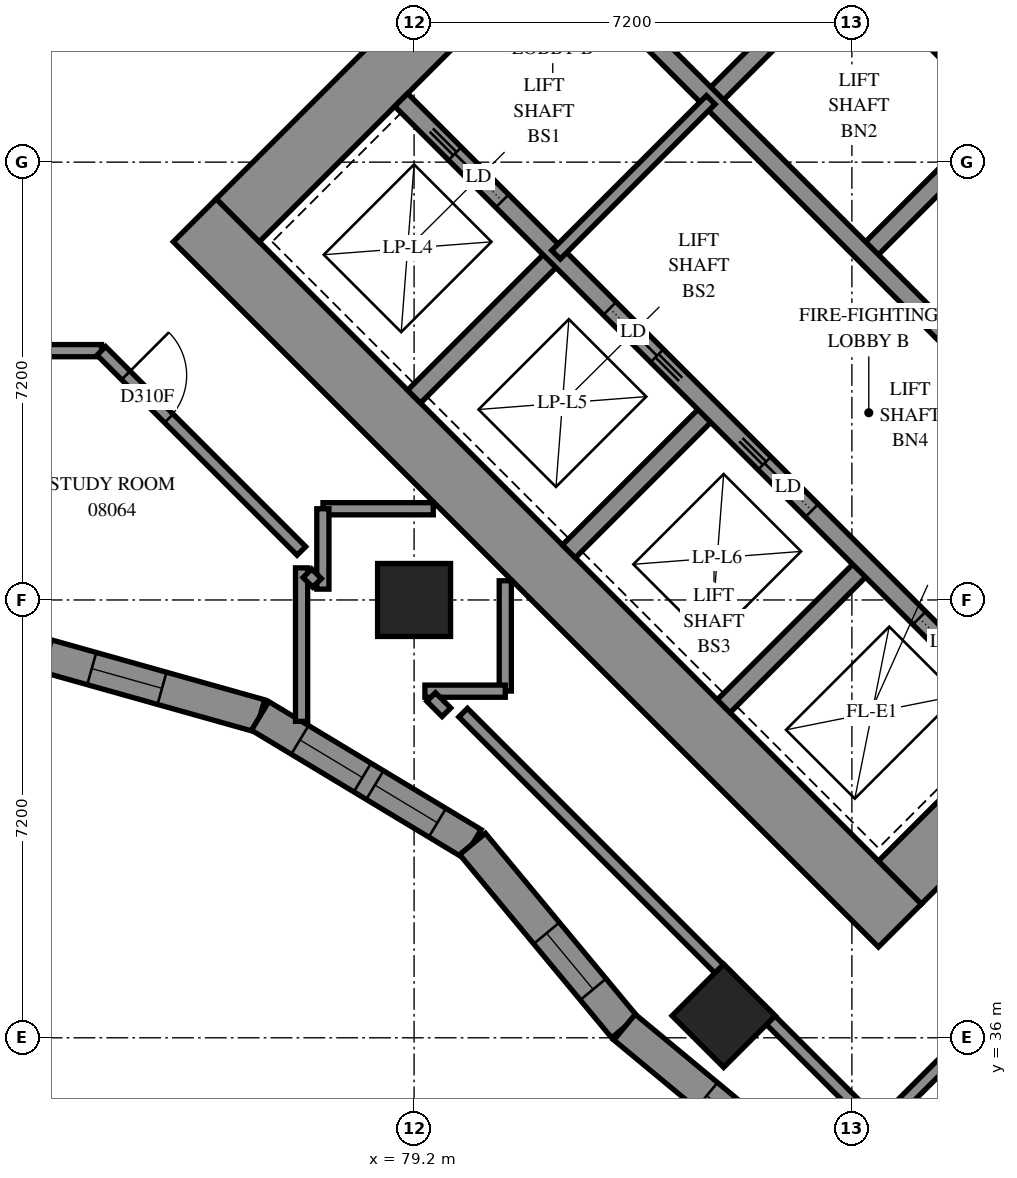
"""IFC4 building model, lengths in metres.
Left out: names, types, materials, properties, quantities, classifications, styles, units other than length and angle.
Written with IfcOpenShell. Run it as: python <this file> out.ifc"""

import sys

from ifc_helpers import new_model, si_unit, direction, frame, frame_2d, origin, origin_2d, place, context, subcontext, project, spatial, polyline, rectangle, outline, extrude, element, fill, save


model = new_model("IFC4")
c1 = context("Model", 3, precision=1e-05, world=origin(), true_north=direction((0.0, 1.0)))
c2 = subcontext(c1, "Body", "Model", "MODEL_VIEW")
j1 = project(units=[si_unit("LENGTHUNIT", "METRE"), si_unit("PLANEANGLEUNIT", "RADIAN")], contexts=[c1])
p1 = place(None, origin())
s1 = spatial("IfcSite", under=j1, at=p1, CompositionType="ELEMENT")
p2 = place(p1, origin())
s2 = spatial("IfcBuilding", under=s1, at=p2, CompositionType="ELEMENT")
p3 = place(p2, frame((0.0, 0.0, 33.8)))
s3 = spatial("IfcBuildingStorey", under=s2, at=p3, CompositionType="ELEMENT", Elevation=33.8)
for number, where, z_axis, x_axis in (
    (1, (79.2, 43.2, 0.0), (0.0, 0.0, 1.0), (1.0, 0.0, 0.0)),
    (2, (84.291, 36.362, 0.0), (0.0, 0.0, 1.0), (0.707, -0.707, 0.0)),
):
    element("IfcColumn", number, at=place(p3, frame(where, z_axis=z_axis, x_axis=x_axis)), inside=s3, PredefinedType="COLUMN", context=c2, shape_type="SweptSolid", body=[
        extrude(rectangle(XDim=1.2, YDim=1.2, at=origin_2d()), origin(), (0.0, 0.0, 1.0), 3.1),
    ])
p4 = place(p3, frame((75.594, 49.443, -0.3), z_axis=(0.0, 0.0, 1.0), x_axis=(0.7071037324, -0.70710983, 0.0)))
e3 = element("IfcWall", 3, at=p4, inside=s3, PredefinedType="SHEAR", context=c2, shape_type="SweptSolid", body=[
    extrude(rectangle(XDim=16.4, YDim=1.0, at=frame_2d((8.2, 0.0))), origin(), (0.0, 0.0, 1.0), 2.7),
])
p5 = place(p3, frame((86.483, 60.333, -0.3), z_axis=(0.0, 0.0, 1.0), x_axis=(0.70710983, -0.7071037324, 0.0)))
e4 = element("IfcWall", 4, at=p5, inside=s3, PredefinedType="SHEAR", context=c2, shape_type="SweptSolid", body=[
    extrude(rectangle(XDim=16.4, YDim=1.0, at=frame_2d((8.2, 0.0))), origin(), (0.0, 0.0, 1.0), 2.7),
])
p6 = place(p5, frame((11.0, 0.0, 0.3)))
e5 = element("IfcOpeningElement", 5, at=p6, cuts=e4, PredefinedType="OPENING", context=c2, shape_type="SweptSolid", body=[
    extrude(rectangle(XDim=0.8, YDim=2.1, at=frame_2d((0.4, 1.05))), frame((0.0, 0.51, 0.0), z_axis=(0.0, -1.0, 0.0), x_axis=(1.0, 0.0, 0.0)), (0.0, 0.0, 1.0), 1.02),
])
p7 = place(p3, frame((76.301, 49.443, -0.3), z_axis=(0.0, 0.0, 1.0), x_axis=(0.7071067812, 0.7071067812, 0.0)))
e6 = element("IfcWall", 6, at=p7, inside=s3, PredefinedType="SHEAR", context=c2, shape_type="SweptSolid", body=[
    extrude(rectangle(XDim=14.4, YDim=1.0, at=frame_2d((7.2, 0.0))), origin(), (0.0, 0.0, 1.0), 2.7),
])
p8 = place(p7, frame((4.55, 0.0, 0.3)))
e7 = element("IfcOpeningElement", 7, at=p8, cuts=e6, PredefinedType="OPENING", context=c2, shape_type="SweptSolid", body=[
    extrude(rectangle(XDim=1.1, YDim=2.1, at=frame_2d((0.55, 1.05))), frame((0.0, 0.51, 0.0), z_axis=(0.0, -1.0, 0.0), x_axis=(1.0, 0.0, 0.0)), (0.0, 0.0, 1.0), 1.02),
])
p9 = place(p7, frame((11.35, 0.0, 0.3)))
e8 = element("IfcOpeningElement", 8, at=p9, cuts=e6, PredefinedType="OPENING", context=c2, shape_type="SweptSolid", body=[
    extrude(rectangle(XDim=1.1, YDim=2.1, at=frame_2d((0.55, 1.05))), frame((0.0, 0.51, 0.0), z_axis=(0.0, -1.0, 0.0), x_axis=(1.0, 0.0, 0.0)), (0.0, 0.0, 1.0), 1.02),
])
p10 = place(p3, frame((87.19, 38.554, -0.3), z_axis=(0.0, 0.0, 1.0), x_axis=(0.707103309, 0.7071102534, 0.0)))
e9 = element("IfcWall", 9, at=p10, inside=s3, PredefinedType="SHEAR", context=c2, shape_type="SweptSolid", body=[
    extrude(rectangle(XDim=14.4, YDim=1.0, at=frame_2d((7.2, 0.0))), origin(), (0.0, 0.0, 1.0), 2.7),
])
p11 = place(p10, frame((4.55, 0.0, 0.3)))
e10 = element("IfcOpeningElement", 10, at=p11, cuts=e9, PredefinedType="OPENING", context=c2, shape_type="SweptSolid", body=[
    extrude(rectangle(XDim=1.1, YDim=2.1, at=frame_2d((0.55, 1.05))), frame((0.0, 0.51, 0.0), z_axis=(0.0, -1.0, 0.0), x_axis=(1.0, 0.0, 0.0)), (0.0, 0.0, 1.0), 1.02),
])
p12 = place(p10, frame((11.35, 0.0, 0.3)))
e11 = element("IfcOpeningElement", 11, at=p12, cuts=e9, PredefinedType="OPENING", context=c2, shape_type="SweptSolid", body=[
    extrude(rectangle(XDim=1.1, YDim=2.1, at=frame_2d((0.55, 1.05))), frame((0.0, 0.51, 0.0), z_axis=(0.0, -1.0, 0.0), x_axis=(1.0, 0.0, 0.0)), (0.0, 0.0, 1.0), 1.02),
])
for number, where, z_axis, x_axis in (
    (12, (79.2, 46.544, 0.0), (0.0, 0.0, 1.0), (0.707, 0.707, 0.0)),
    (13, (84.079, 51.423, 0.0), (0.0, 0.0, 1.0), (0.707, 0.707, 0.0)),
):
    element("IfcWall", number, at=place(p3, frame(where, z_axis=z_axis, x_axis=x_axis)), inside=s3, PredefinedType="SOLIDWALL", context=c2, shape_type="SweptSolid", body=[
        extrude(rectangle(XDim=3.3, YDim=0.3, at=frame_2d((1.65, 0.0))), origin(), (0.0, 0.0, 1.0), 3.1),
    ])
p13 = place(p3, frame((81.746, 43.999, 0.0), z_axis=(0.0, 0.0, 1.0), x_axis=(0.7071067812, 0.7071067812, 0.0)))
e14 = element("IfcWall", 14, at=p13, inside=s3, PredefinedType="SOLIDWALL", context=c2, shape_type="SweptSolid", body=[
    extrude(rectangle(XDim=3.3, YDim=0.3, at=frame_2d((1.65, 0.0))), origin(), (0.0, 0.0, 1.0), 3.1),
])
p14 = place(p3, frame((86.625, 48.878, 0.0), z_axis=(0.0, 0.0, 1.0), x_axis=(0.7071067812, 0.7071067812, 0.0)))
e15 = element("IfcWall", 15, at=p14, inside=s3, PredefinedType="SOLIDWALL", context=c2, shape_type="SweptSolid", body=[
    extrude(rectangle(XDim=3.3, YDim=0.3, at=frame_2d((1.65, 0.0))), origin(), (0.0, 0.0, 1.0), 3.1),
])
p15 = place(p3, frame((84.291, 41.453, 0.0), z_axis=(0.0, 0.0, 1.0), x_axis=(0.7071067812, 0.7071067812, 0.0)))
e16 = element("IfcWall", 16, at=p15, inside=s3, PredefinedType="SOLIDWALL", context=c2, shape_type="SweptSolid", body=[
    extrude(rectangle(XDim=3.3, YDim=0.3, at=frame_2d((1.65, 0.0))), origin(), (0.0, 0.0, 1.0), 3.1),
])
p16 = place(p3, frame((78.988, 51.423, 0.0), z_axis=(0.0, 0.0, 1.0), x_axis=(0.7071067812, -0.7071067812, 0.0)))
e17 = element("IfcWall", 17, at=p16, inside=s3, PredefinedType="SOLIDWALL", context=c2, shape_type="SweptSolid", body=[
    extrude(rectangle(XDim=14.4, YDim=0.3, at=frame_2d((7.2, 0.0))), origin(), (0.0, 0.0, 1.0), 3.1),
])
p17 = place(p16, frame((1.25, 0.0, 0.0)))
e18 = element("IfcOpeningElement", 18, at=p17, cuts=e17, PredefinedType="OPENING", context=c2, shape_type="SweptSolid", body=[
    extrude(rectangle(XDim=1.1, YDim=2.1, at=frame_2d((0.55, 1.05))), frame((0.0, 0.16, 0.0), z_axis=(0.0, -1.0, 0.0), x_axis=(1.0, 0.0, 0.0)), (0.0, 0.0, 1.0), 0.32),
])
p18 = place(p16, frame((4.85, 0.0, 0.0)))
e19 = element("IfcOpeningElement", 19, at=p18, cuts=e17, PredefinedType="OPENING", context=c2, shape_type="SweptSolid", body=[
    extrude(rectangle(XDim=1.1, YDim=2.1, at=frame_2d((0.55, 1.05))), frame((0.0, 0.16, 0.0), z_axis=(0.0, -1.0, 0.0), x_axis=(1.0, 0.0, 0.0)), (0.0, 0.0, 1.0), 0.32),
])
p19 = place(p16, frame((8.45, 0.0, 0.0)))
e20 = element("IfcOpeningElement", 20, at=p19, cuts=e17, PredefinedType="OPENING", context=c2, shape_type="SweptSolid", body=[
    extrude(rectangle(XDim=1.1, YDim=2.1, at=frame_2d((0.55, 1.05))), frame((0.0, 0.16, 0.0), z_axis=(0.0, -1.0, 0.0), x_axis=(1.0, 0.0, 0.0)), (0.0, 0.0, 1.0), 0.32),
])
p20 = place(p16, frame((12.05, 0.0, 0.0)))
e21 = element("IfcOpeningElement", 21, at=p20, cuts=e17, PredefinedType="OPENING", context=c2, shape_type="SweptSolid", body=[
    extrude(rectangle(XDim=1.1, YDim=2.1, at=frame_2d((0.55, 1.05))), frame((0.0, 0.16, 0.0), z_axis=(0.0, -1.0, 0.0), x_axis=(1.0, 0.0, 0.0)), (0.0, 0.0, 1.0), 0.32),
])
p21 = place(p3, frame((81.534, 53.969, 0.0), z_axis=(0.0, 0.0, 1.0), x_axis=(0.707103309, -0.7071102534, 0.0)))
e22 = element("IfcWall", 22, at=p21, inside=s3, PredefinedType="SOLIDWALL", context=c2, shape_type="SweptSolid", body=[
    extrude(rectangle(XDim=14.4, YDim=0.3, at=frame_2d((7.2, 0.0))), origin(), (0.0, 0.0, 1.0), 3.1),
])
p22 = place(p21, frame((12.05, 0.0, 0.0)))
e23 = element("IfcOpeningElement", 23, at=p22, cuts=e22, PredefinedType="OPENING", context=c2, shape_type="SweptSolid", body=[
    extrude(rectangle(XDim=1.1, YDim=2.1, at=frame_2d((0.55, 1.05))), frame((0.0, 0.16, 0.0), z_axis=(0.0, -1.0, 0.0), x_axis=(1.0, 0.0, 0.0)), (0.0, 0.0, 1.0), 0.32),
])
p23 = place(p3, frame((83.867, 56.302, 0.0), z_axis=(0.0, 0.0, 1.0), x_axis=(0.7071137256, -0.7070998367, 0.0)))
e24 = element("IfcWall", 24, at=p23, inside=s3, PredefinedType="SOLIDWALL", context=c2, shape_type="SweptSolid", body=[
    extrude(rectangle(XDim=7.2, YDim=0.3, at=frame_2d((3.6, 0.0))), origin(), (0.0, 0.0, 1.0), 3.1),
])
p24 = place(p3, frame((73.162, 42.279, 0.0), z_axis=(0.0, 0.0, 1.0), x_axis=(0.9627115194, -0.2705300916, 0.0)))
e25 = element("IfcWall", 25, at=p24, inside=s3, PredefinedType="SOLIDWALL", context=c2, shape_type="SweptSolid", body=[
    extrude(outline(polyline([(0.053, -0.275), (3.605, -0.275), (3.679, 0.275), (-0.053, 0.275), (0.053, -0.275)])), origin(), (0.0, 0.0, 1.0), 3.1),
])
p25 = place(p24, frame((0.766, 0.0, 0.5)))
e26 = element("IfcOpeningElement", 26, at=p25, cuts=e25, PredefinedType="OPENING", context=c2, shape_type="SweptSolid", body=[
    extrude(rectangle(XDim=1.2, YDim=2.45, at=frame_2d((0.6, 1.225))), frame((0.0, 0.285, 0.0), z_axis=(0.0, -1.0, 0.0), x_axis=(1.0, 0.0, 0.0)), (0.0, 0.0, 1.0), 0.57),
])
p26 = place(p3, frame((76.668, 41.294, 0.0), z_axis=(0.0, 0.0, 1.0), x_axis=(0.8564375758, -0.5162505968, 0.0)))
e27 = element("IfcWall", 27, at=p26, inside=s3, PredefinedType="SOLIDWALL", context=c2, shape_type="SweptSolid", body=[
    extrude(outline(polyline([(0.037, -0.275), (4.032, -0.275), (4.125, 0.275), (-0.037, 0.275), (0.037, -0.275)])), origin(), (0.0, 0.0, 1.0), 3.1),
])
p27 = place(p26, frame((0.764, 0.0, 0.5)))
e28 = element("IfcOpeningElement", 28, at=p27, cuts=e27, PredefinedType="OPENING", context=c2, shape_type="SweptSolid", body=[
    extrude(rectangle(XDim=1.2, YDim=2.45, at=frame_2d((0.6, 1.225))), frame((0.0, 0.285, 0.0), z_axis=(0.0, -1.0, 0.0), x_axis=(1.0, 0.0, 0.0)), (0.0, 0.0, 1.0), 0.57),
])
p28 = place(p26, frame((2.204, 0.0, 0.5)))
e29 = element("IfcOpeningElement", 29, at=p28, cuts=e27, PredefinedType="OPENING", context=c2, shape_type="SweptSolid", body=[
    extrude(rectangle(XDim=1.2, YDim=2.45, at=frame_2d((0.6, 1.225))), frame((0.0, 0.285, 0.0), z_axis=(0.0, -1.0, 0.0), x_axis=(1.0, 0.0, 0.0)), (0.0, 0.0, 1.0), 0.57),
])
p29 = place(p3, frame((80.161, 39.188, 0.0), z_axis=(0.0, 0.0, 1.0), x_axis=(0.6385248375, -0.7696012161, 0.0)))
e30 = element("IfcWall", 30, at=p29, inside=s3, PredefinedType="SOLIDWALL", context=c2, shape_type="SweptSolid", body=[
    extrude(outline(polyline([(0.047, -0.275), (3.941, -0.275), (3.89, 0.275), (-0.047, 0.275), (0.047, -0.275)])), origin(), (0.0, 0.0, 1.0), 3.1),
])
p30 = place(p29, frame((1.907, 0.0, 0.5)))
e31 = element("IfcOpeningElement", 31, at=p30, cuts=e30, PredefinedType="OPENING", context=c2, shape_type="SweptSolid", body=[
    extrude(rectangle(XDim=1.2, YDim=2.45, at=frame_2d((0.6, 1.225))), frame((0.0, 0.285, 0.0), z_axis=(0.0, -1.0, 0.0), x_axis=(1.0, 0.0, 0.0)), (0.0, 0.0, 1.0), 0.57),
])
p31 = place(p3, frame((82.661, 36.175, 0.0), z_axis=(0.0, 0.0, 1.0), x_axis=(0.7696065296, -0.6385184333, 0.0)))
e32 = element("IfcWall", 32, at=p31, inside=s3, PredefinedType="SOLIDWALL", context=c2, shape_type="SweptSolid", body=[
    extrude(outline(polyline([(-0.026, -0.275), (3.869, -0.275), (3.92, 0.275), (0.026, 0.275), (-0.026, -0.275)])), origin(), (0.0, 0.0, 1.0), 3.1),
])
p32 = place(p31, frame((1.76, 0.0, 0.5)))
e33 = element("IfcOpeningElement", 33, at=p32, cuts=e32, PredefinedType="OPENING", context=c2, shape_type="SweptSolid", body=[
    extrude(rectangle(XDim=1.2, YDim=2.45, at=frame_2d((0.6, 1.225))), frame((0.0, 0.285, 0.0), z_axis=(0.0, -1.0, 0.0), x_axis=(1.0, 0.0, 0.0)), (0.0, 0.0, 1.0), 0.57),
])
p33 = place(p3, frame((81.534, 48.878, 0.0), z_axis=(0.0, 0.0, 1.0), x_axis=(0.707092892, 0.7071206701, 0.0)))
e34 = element("IfcWall", 34, at=p33, inside=s3, PredefinedType="PARTITIONING", context=c2, shape_type="SweptSolid", body=[
    extrude(rectangle(XDim=3.6, YDim=0.2, at=frame_2d((1.8, 0.0))), origin(), (0.0, 0.0, 1.0), 3.1),
])
p34 = place(p3, frame((54.5, 47.3, 0.0), z_axis=(0.0, 0.0, 1.0), x_axis=(1.0, 0.0, 0.0)))
e35 = element("IfcWall", 35, at=p34, inside=s3, PredefinedType="PARTITIONING", context=c2, shape_type="SweptSolid", body=[
    extrude(rectangle(XDim=19.56, YDim=0.2, at=frame_2d((9.78, 0.0))), origin(), (0.0, 0.0, 1.0), 3.1),
])
p35 = place(p34, frame((0.243, 0.0, 0.0)))
e36 = element("IfcOpeningElement", 36, at=p35, cuts=e35, PredefinedType="OPENING", context=c2, shape_type="SweptSolid", body=[
    extrude(rectangle(XDim=1.0, YDim=2.1, at=frame_2d((0.5, 1.05))), frame((0.0, 0.11, 0.0), z_axis=(0.0, -1.0, 0.0), x_axis=(1.0, 0.0, 0.0)), (0.0, 0.0, 1.0), 0.22),
])
p36 = place(p34, frame((5.4, 0.0, 0.0)))
e37 = element("IfcOpeningElement", 37, at=p36, cuts=e35, PredefinedType="OPENING", context=c2, shape_type="SweptSolid", body=[
    extrude(rectangle(XDim=0.9, YDim=2.1, at=frame_2d((0.45, 1.05))), frame((0.0, 0.11, 0.0), z_axis=(0.0, -1.0, 0.0), x_axis=(1.0, 0.0, 0.0)), (0.0, 0.0, 1.0), 0.22),
])
p37 = place(p34, frame((7.1, 0.0, 0.0)))
e38 = element("IfcOpeningElement", 38, at=p37, cuts=e35, PredefinedType="OPENING", context=c2, shape_type="SweptSolid", body=[
    extrude(rectangle(XDim=0.9, YDim=2.1, at=frame_2d((0.45, 1.05))), frame((0.0, 0.11, 0.0), z_axis=(0.0, -1.0, 0.0), x_axis=(1.0, 0.0, 0.0)), (0.0, 0.0, 1.0), 0.22),
])
p38 = place(p34, frame((12.6, 0.0, 0.0)))
e39 = element("IfcOpeningElement", 39, at=p38, cuts=e35, PredefinedType="OPENING", context=c2, shape_type="SweptSolid", body=[
    extrude(rectangle(XDim=0.9, YDim=2.1, at=frame_2d((0.45, 1.05))), frame((0.0, 0.11, 0.0), z_axis=(0.0, -1.0, 0.0), x_axis=(1.0, 0.0, 0.0)), (0.0, 0.0, 1.0), 0.22),
])
p39 = place(p34, frame((14.3, 0.0, 0.0)))
e40 = element("IfcOpeningElement", 40, at=p39, cuts=e35, PredefinedType="OPENING", context=c2, shape_type="SweptSolid", body=[
    extrude(rectangle(XDim=0.9, YDim=2.1, at=frame_2d((0.45, 1.05))), frame((0.0, 0.11, 0.0), z_axis=(0.0, -1.0, 0.0), x_axis=(1.0, 0.0, 0.0)), (0.0, 0.0, 1.0), 0.22),
])
p40 = place(p3, frame((86.838, 34.522, 0.0), z_axis=(0.0, 0.0, 1.0), x_axis=(0.7072154749, 0.7069980708, 0.0)))
e41 = element("IfcWall", 41, at=p40, inside=s3, PredefinedType="PARTITIONING", context=c2, shape_type="SweptSolid", body=[
    extrude(rectangle(XDim=9.2, YDim=0.2, at=frame_2d((4.6, 0.0))), origin(), (0.0, 0.0, 1.0), 3.1),
])
p41 = place(p3, frame((86.332, 33.307, 0.0), z_axis=(0.0, 0.0, 1.0), x_axis=(0.7069820292, 0.7072315112, 0.0)))
e42 = element("IfcWall", 42, at=p41, inside=s3, PredefinedType="PARTITIONING", context=c2, shape_type="SweptSolid", body=[
    extrude(rectangle(XDim=8.017, YDim=0.2, at=frame_2d((4.008, 0.0))), origin(), (0.0, 0.0, 1.0), 3.1),
])
p42 = place(p3, frame((80.007, 41.347, 0.0), z_axis=(0.0, 0.0, 1.0), x_axis=(0.7071067812, -0.7071067812, 0.0)))
e43 = element("IfcWall", 43, at=p42, inside=s3, PredefinedType="PARTITIONING", context=c2, shape_type="SweptSolid", body=[
    extrude(rectangle(XDim=6.206, YDim=0.2, at=frame_2d((3.103, 0.0))), origin(), (0.0, 0.0, 1.0), 3.1),
])
p43 = place(p3, frame((74.057, 47.297, 0.0), z_axis=(0.0, 0.0, 1.0), x_axis=(0.7071067812, -0.7071067812, 0.0)))
e44 = element("IfcWall", 44, at=p43, inside=s3, PredefinedType="PARTITIONING", context=c2, shape_type="SweptSolid", body=[
    extrude(rectangle(XDim=4.653, YDim=0.2, at=frame_2d((2.326, 0.0))), origin(), (0.0, 0.0, 1.0), 3.1),
])
p44 = place(p43, frame((0.57, 0.0, 0.0)))
e45 = element("IfcOpeningElement", 45, at=p44, cuts=e44, PredefinedType="OPENING", context=c2, shape_type="SweptSolid", body=[
    extrude(rectangle(XDim=1.0, YDim=2.1, at=frame_2d((0.5, 1.05))), frame((0.0, 0.11, 0.0), z_axis=(0.0, -1.0, 0.0), x_axis=(1.0, 0.0, 0.0)), (0.0, 0.0, 1.0), 0.22),
])
p45 = place(p3, frame((84.889, 36.465, 0.0), z_axis=(0.0, 0.0, 1.0), x_axis=(0.7071067812, -0.7071067812, 0.0)))
e46 = element("IfcWall", 46, at=p45, inside=s3, PredefinedType="PARTITIONING", context=c2, shape_type="SweptSolid", body=[
    extrude(rectangle(XDim=2.749, YDim=0.2, at=frame_2d((1.375, 0.0))), origin(), (0.0, 0.0, 1.0), 3.1),
])
p46 = place(p3, frame((77.35, 41.204, 0.0), z_axis=(0.0, 0.0, 1.0), x_axis=(0.0, 1.0, 0.0)))
e47 = element("IfcWall", 47, at=p46, inside=s3, PredefinedType="PARTITIONING", context=c2, shape_type="SweptSolid", body=[
    extrude(rectangle(XDim=2.524, YDim=0.2, at=frame_2d((1.262, 0.0))), origin(), (0.0, 0.0, 1.0), 3.1),
])
for number, where, z_axis, x_axis in (
    (48, (77.702, 44.7, 0.0), (0.0, 0.0, 1.0), (1.0, 0.0, 0.0)),
    (49, (80.7, 41.702, 0.0), (0.0, 0.0, 1.0), (0.0, 1.0, 0.0)),
):
    element("IfcWall", number, at=place(p3, frame(where, z_axis=z_axis, x_axis=x_axis)), inside=s3, PredefinedType="PARTITIONING", context=c2, shape_type="SweptSolid", body=[
        extrude(rectangle(XDim=1.814, YDim=0.2, at=frame_2d((0.907, 0.0))), origin(), (0.0, 0.0, 1.0), 3.1),
    ])
for number, where, z_axis, x_axis in (
    (50, (77.7, 43.378, 0.0), (0.0, 0.0, 1.0), (0.0, 1.0, 0.0)),
    (51, (79.378, 41.7, 0.0), (0.0, 0.0, 1.0), (1.0, 0.0, 0.0)),
):
    element("IfcWall", number, at=place(p3, frame(where, z_axis=z_axis, x_axis=x_axis)), inside=s3, PredefinedType="PARTITIONING", context=c2, shape_type="SweptSolid", body=[
        extrude(rectangle(XDim=1.322, YDim=0.2, at=frame_2d((0.661, 0.0))), origin(), (0.0, 0.0, 1.0), 3.1),
    ])
p47 = place(p3, frame((77.445, 43.64, 0.0), z_axis=(0.0, 0.0, 1.0), x_axis=(0.7071067812, -0.7071067812, 0.0)))
e52 = element("IfcWall", 52, at=p47, inside=s3, PredefinedType="PARTITIONING", context=c2, shape_type="SweptSolid", body=[
    extrude(rectangle(XDim=0.225, YDim=0.2, at=frame_2d((0.113, 0.0))), origin(), (0.0, 0.0, 1.0), 3.1),
])
p48 = place(p3, frame((79.481, 41.605, 0.0), z_axis=(0.0, 0.0, 1.0), x_axis=(0.7071067812, -0.7071067812, 0.0)))
e53 = element("IfcWall", 53, at=p48, inside=s3, PredefinedType="PARTITIONING", context=c2, shape_type="SweptSolid", body=[
    extrude(rectangle(XDim=0.355, YDim=0.2, at=frame_2d((0.177, 0.0))), origin(), (0.0, 0.0, 1.0), 3.1),
])
p49 = place(p25, origin())
e54 = element("IfcWindow", 54, at=p49, inside=s3, PartitioningType="SINGLE_PANEL", PredefinedType="WINDOW", context=c2, shape_type="SweptSolid", body=[
    extrude(rectangle(XDim=1.2, YDim=2.45, at=frame_2d((0.6, 1.225))), frame((0.0, 0.155, 0.0), z_axis=(0.0, -1.0, 0.0), x_axis=(1.0, 0.0, 0.0)), (0.0, 0.0, 1.0), 0.06),
])
fill(e26, e54)
p50 = place(p27, origin())
e55 = element("IfcWindow", 55, at=p50, inside=s3, PartitioningType="SINGLE_PANEL", PredefinedType="WINDOW", context=c2, shape_type="SweptSolid", body=[
    extrude(rectangle(XDim=1.2, YDim=2.45, at=frame_2d((0.6, 1.225))), frame((0.0, 0.155, 0.0), z_axis=(0.0, -1.0, 0.0), x_axis=(1.0, 0.0, 0.0)), (0.0, 0.0, 1.0), 0.06),
])
fill(e28, e55)
p51 = place(p28, origin())
e56 = element("IfcWindow", 56, at=p51, inside=s3, PartitioningType="SINGLE_PANEL", PredefinedType="WINDOW", context=c2, shape_type="SweptSolid", body=[
    extrude(rectangle(XDim=1.2, YDim=2.45, at=frame_2d((0.6, 1.225))), frame((0.0, 0.155, 0.0), z_axis=(0.0, -1.0, 0.0), x_axis=(1.0, 0.0, 0.0)), (0.0, 0.0, 1.0), 0.06),
])
fill(e29, e56)
p52 = place(p30, origin())
e57 = element("IfcWindow", 57, at=p52, inside=s3, PartitioningType="SINGLE_PANEL", PredefinedType="WINDOW", context=c2, shape_type="SweptSolid", body=[
    extrude(rectangle(XDim=1.2, YDim=2.45, at=frame_2d((0.6, 1.225))), frame((0.0, 0.155, 0.0), z_axis=(0.0, -1.0, 0.0), x_axis=(1.0, 0.0, 0.0)), (0.0, 0.0, 1.0), 0.06),
])
fill(e31, e57)
p53 = place(p32, origin())
e58 = element("IfcWindow", 58, at=p53, inside=s3, PartitioningType="SINGLE_PANEL", PredefinedType="WINDOW", context=c2, shape_type="SweptSolid", body=[
    extrude(rectangle(XDim=1.2, YDim=2.45, at=frame_2d((0.6, 1.225))), frame((0.0, 0.155, 0.0), z_axis=(0.0, -1.0, 0.0), x_axis=(1.0, 0.0, 0.0)), (0.0, 0.0, 1.0), 0.06),
])
fill(e33, e58)
p54 = place(p17, origin())
e59 = element("IfcDoor", 59, at=p54, inside=s3, OperationType="SLIDING_TO_LEFT", PredefinedType="DOOR", context=c2, shape_type="SweptSolid", body=[
    extrude(rectangle(XDim=1.1, YDim=2.1, at=frame_2d((0.55, 1.05))), frame((0.0, 0.025, 0.0), z_axis=(0.0, -1.0, 0.0), x_axis=(1.0, 0.0, 0.0)), (0.0, 0.0, 1.0), 0.05),
])
fill(e18, e59)
p55 = place(p18, origin())
e60 = element("IfcDoor", 60, at=p55, inside=s3, OperationType="SLIDING_TO_RIGHT", PredefinedType="DOOR", context=c2, shape_type="SweptSolid", body=[
    extrude(rectangle(XDim=1.1, YDim=2.1, at=frame_2d((0.55, 1.05))), frame((0.0, 0.025, 0.0), z_axis=(0.0, -1.0, 0.0), x_axis=(1.0, 0.0, 0.0)), (0.0, 0.0, 1.0), 0.05),
])
fill(e19, e60)
p56 = place(p19, origin())
e61 = element("IfcDoor", 61, at=p56, inside=s3, OperationType="SLIDING_TO_LEFT", PredefinedType="DOOR", context=c2, shape_type="SweptSolid", body=[
    extrude(rectangle(XDim=1.1, YDim=2.1, at=frame_2d((0.55, 1.05))), frame((0.0, 0.025, 0.0), z_axis=(0.0, -1.0, 0.0), x_axis=(1.0, 0.0, 0.0)), (0.0, 0.0, 1.0), 0.05),
])
fill(e20, e61)
p57 = place(p20, origin())
e62 = element("IfcDoor", 62, at=p57, inside=s3, OperationType="SLIDING_TO_RIGHT", PredefinedType="DOOR", context=c2, shape_type="SweptSolid", body=[
    extrude(rectangle(XDim=1.1, YDim=2.1, at=frame_2d((0.55, 1.05))), frame((0.0, 0.025, 0.0), z_axis=(0.0, -1.0, 0.0), x_axis=(1.0, 0.0, 0.0)), (0.0, 0.0, 1.0), 0.05),
])
fill(e21, e62)
p58 = place(p44, origin())
e63 = element("IfcDoor", 63, at=p58, inside=s3, OperationType="SINGLE_SWING_LEFT", PredefinedType="DOOR", context=c2, shape_type="SweptSolid", body=[
    extrude(rectangle(XDim=1.0, YDim=2.1, at=frame_2d((0.5, 1.05))), frame((0.0, 0.025, 0.0), z_axis=(0.0, -1.0, 0.0), x_axis=(1.0, 0.0, 0.0)), (0.0, 0.0, 1.0), 0.05),
])
fill(e45, e63)
save(model, sys.argv[1])
